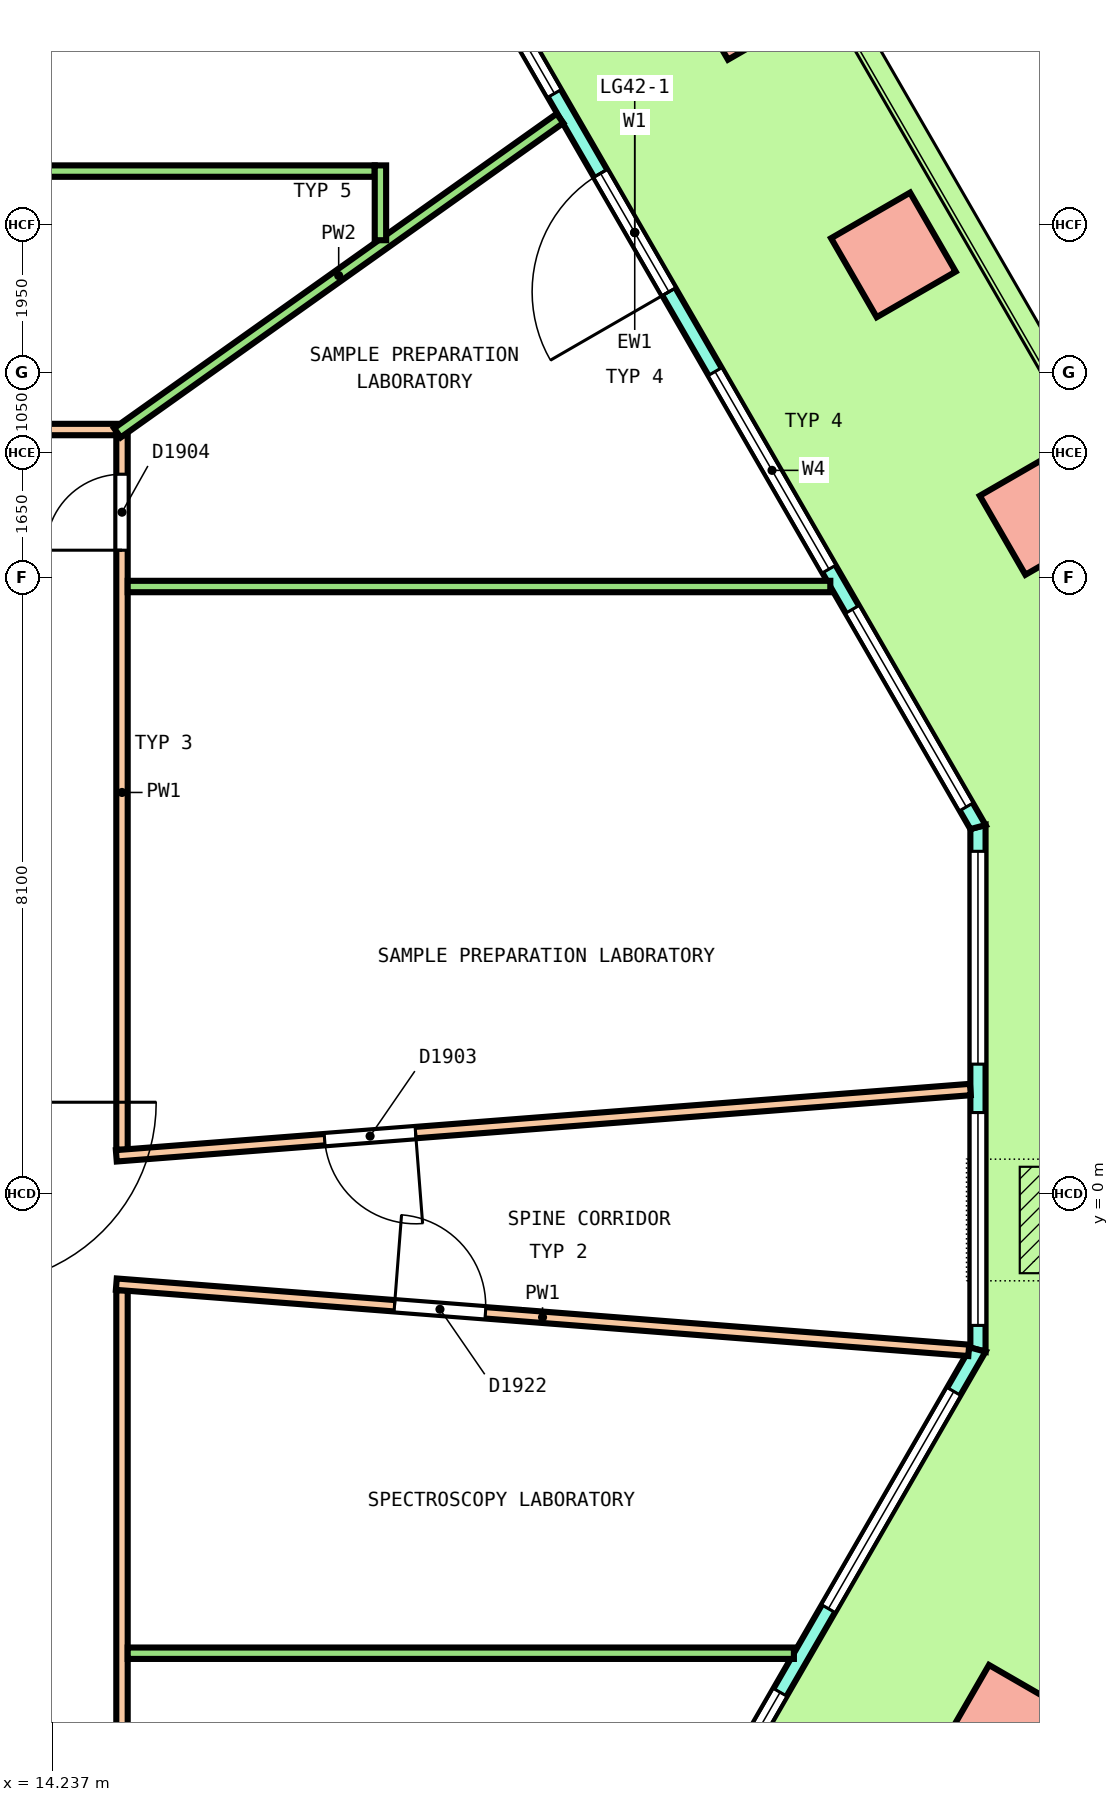
"""IFC4 building model, lengths in metres.
Left out: names, types, materials, properties, quantities, classifications, styles, units other than length and angle.
Written with IfcOpenShell. Run it as: python <this file> out.ifc"""

import sys

from ifc_helpers import new_model, si_unit, direction, frame, frame_2d, origin, origin_2d, place, context, subcontext, project, spatial, polyline, rectangle, outline, extrude, element, fill, save


model = new_model("IFC4")
c1 = context("Model", 3, precision=1e-05, world=origin(), true_north=direction((0.0, 1.0)))
c2 = subcontext(c1, "Body", "Model", "MODEL_VIEW")
j1 = project(units=[si_unit("LENGTHUNIT", "METRE"), si_unit("PLANEANGLEUNIT", "RADIAN")], contexts=[c1])
p1 = place(None, origin())
s1 = spatial("IfcSite", under=j1, at=p1, CompositionType="ELEMENT")
p2 = place(p1, origin())
s2 = spatial("IfcBuilding", under=s1, at=p2, CompositionType="ELEMENT")
p3 = place(p2, frame((0.0, 0.0, 193.6)))
s3 = spatial("IfcBuildingStorey", under=s2, at=p3, CompositionType="ELEMENT", Elevation=193.6)
for number, where, z_axis, x_axis in (
    (1, (27.255, 8.959, 0.0), (0.0, 0.0, 1.0), (-0.5, 0.866, 0.0)),
    (2, (25.299, 12.347, 0.0), (0.0, 0.0, 1.0), (-0.5, 0.866, 0.0)),
    (3, (23.342, 15.736, 0.0), (0.0, 0.0, 1.0), (-0.5, 0.866, 0.0)),
    (4, (26.776, -7.023, 0.0), (0.0, 0.0, 1.0), (0.5, 0.866, 0.0)),
):
    element("IfcColumn", number, at=place(p3, frame(where, z_axis=z_axis, x_axis=x_axis)), inside=s3, PredefinedType="COLUMN", context=c2, shape_type="SweptSolid", body=[
        extrude(rectangle(XDim=1.2, YDim=1.2, at=origin_2d()), origin(), (0.0, 0.0, 1.0), 4.04),
    ])
p4 = place(p3, frame((26.411, -2.055, 0.0), z_axis=(0.0, 0.0, 1.0), x_axis=(0.0, 1.0, 0.0)))
e5 = element("IfcWall", 5, at=p4, inside=s3, PredefinedType="SOLIDWALL", context=c2, shape_type="SweptSolid", body=[
    extrude(outline(polyline([(-0.027, -0.1), (1.128, -0.1), (2.283, -0.1), (3.438, -0.1), (4.592, -0.1), (5.747, -0.1), (6.902, -0.1), (6.848, 0.1), (5.711, 0.1), (4.574, 0.1), (3.438, 0.1), (2.301, 0.1), (1.164, 0.1), (0.027, 0.1), (-0.027, -0.1)])), origin(), (0.0, 0.0, 1.0), 4.1),
])
p5 = place(p4, frame((0.319, 0.0, 0.1)))
e6 = element("IfcOpeningElement", 6, at=p5, cuts=e5, PredefinedType="OPENING", context=c2, shape_type="SweptSolid", body=[
    extrude(rectangle(XDim=2.8, YDim=2.9, at=frame_2d((1.4, 1.45))), frame((0.0, 0.11, 0.0), z_axis=(0.0, -1.0, 0.0), x_axis=(1.0, 0.0, 0.0)), (0.0, 0.0, 1.0), 0.22),
])
p6 = place(p4, frame((3.756, 0.0, 0.1)))
e7 = element("IfcOpeningElement", 7, at=p6, cuts=e5, PredefinedType="OPENING", context=c2, shape_type="SweptSolid", body=[
    extrude(rectangle(XDim=2.8, YDim=2.9, at=frame_2d((1.4, 1.45))), frame((0.0, 0.11, 0.0), z_axis=(0.0, -1.0, 0.0), x_axis=(1.0, 0.0, 0.0)), (0.0, 0.0, 1.0), 0.22),
])
p7 = place(p3, frame((26.411, 4.82, 0.0), z_axis=(0.0, 0.0, 1.0), x_axis=(-0.500000137386, 0.866025324465, 0.0)))
e8 = element("IfcWall", 8, at=p7, inside=s3, PredefinedType="SOLIDWALL", context=c2, shape_type="SweptSolid", body=[
    extrude(outline(polyline([(-0.027, -0.1), (0.979, -0.1), (1.986, -0.1), (2.992, -0.1), (3.999, -0.1), (5.005, -0.1), (6.012, -0.1), (7.018, -0.1), (8.025, -0.1), (9.031, -0.1), (10.038, -0.1), (11.044, -0.1), (12.051, -0.1), (13.057, -0.1), (14.063, -0.1), (15.07, -0.1), (16.076, -0.1), (17.083, -0.1), (18.089, -0.1), (18.036, 0.1), (17.035, 0.1), (16.035, 0.1), (15.034, 0.1), (14.034, 0.1), (13.033, 0.1), (12.033, 0.1), (11.032, 0.1), (10.032, 0.1), (9.031, 0.1), (8.031, 0.1), (7.03, 0.1), (6.03, 0.1), (5.029, 0.1), (4.029, 0.1), (3.028, 0.1), (2.028, 0.1), (1.027, 0.1), (0.027, 0.1), (-0.027, -0.1)])), origin(), (0.0, 0.0, 1.0), 4.1),
])
p8 = place(p7, frame((0.306, 0.0, 0.1)))
e9 = element("IfcOpeningElement", 9, at=p8, cuts=e8, PredefinedType="OPENING", context=c2, shape_type="SweptSolid", body=[
    extrude(rectangle(XDim=3.0, YDim=2.9, at=frame_2d((1.5, 1.45))), frame((0.0, 0.11, 0.0), z_axis=(0.0, -1.0, 0.0), x_axis=(1.0, 0.0, 0.0)), (0.0, 0.0, 1.0), 0.22),
])
p9 = place(p7, frame((3.919, 0.0, 0.1)))
e10 = element("IfcOpeningElement", 10, at=p9, cuts=e8, PredefinedType="OPENING", context=c2, shape_type="SweptSolid", body=[
    extrude(rectangle(XDim=3.0, YDim=2.9, at=frame_2d((1.5, 1.45))), frame((0.0, 0.11, 0.0), z_axis=(0.0, -1.0, 0.0), x_axis=(1.0, 0.0, 0.0)), (0.0, 0.0, 1.0), 0.22),
])
p10 = place(p7, frame((8.131, 0.0, 0.0)))
e11 = element("IfcOpeningElement", 11, at=p10, cuts=e8, PredefinedType="OPENING", context=c2, shape_type="SweptSolid", body=[
    extrude(rectangle(XDim=1.8, YDim=2.4, at=frame_2d((0.9, 1.2))), frame((0.0, 0.11, 0.0), z_axis=(0.0, -1.0, 0.0), x_axis=(1.0, 0.0, 0.0)), (0.0, 0.0, 1.0), 0.22),
])
p11 = place(p7, frame((8.131, 0.0, 2.55)))
e12 = element("IfcOpeningElement", 12, at=p11, cuts=e8, PredefinedType="OPENING", context=c2, shape_type="SweptSolid", body=[
    extrude(rectangle(XDim=1.8, YDim=0.45, at=frame_2d((0.9, 0.225))), frame((0.0, 0.11, 0.0), z_axis=(0.0, -1.0, 0.0), x_axis=(1.0, 0.0, 0.0)), (0.0, 0.0, 1.0), 0.22),
])
p12 = place(p7, frame((11.144, 0.0, 0.1)))
e13 = element("IfcOpeningElement", 13, at=p12, cuts=e8, PredefinedType="OPENING", context=c2, shape_type="SweptSolid", body=[
    extrude(rectangle(XDim=3.0, YDim=2.9, at=frame_2d((1.5, 1.45))), frame((0.0, 0.11, 0.0), z_axis=(0.0, -1.0, 0.0), x_axis=(1.0, 0.0, 0.0)), (0.0, 0.0, 1.0), 0.22),
])
p13 = place(p7, frame((14.756, 0.0, 0.1)))
e14 = element("IfcOpeningElement", 14, at=p13, cuts=e8, PredefinedType="OPENING", context=c2, shape_type="SweptSolid", body=[
    extrude(rectangle(XDim=3.0, YDim=2.9, at=frame_2d((1.5, 1.45))), frame((0.0, 0.11, 0.0), z_axis=(0.0, -1.0, 0.0), x_axis=(1.0, 0.0, 0.0)), (0.0, 0.0, 1.0), 0.22),
])
p14 = place(p3, frame((14.985, -21.845, 0.0), z_axis=(0.0, 0.0, 1.0), x_axis=(0.50000204422, 0.86602422355, 0.0)))
e15 = element("IfcWall", 15, at=p14, inside=s3, PredefinedType="SOLIDWALL", context=c2, shape_type="SweptSolid", body=[
    extrude(outline(polyline([(-0.027, -0.1), (1.014, -0.1), (2.055, -0.1), (3.097, -0.1), (4.138, -0.1), (5.179, -0.1), (6.22, -0.1), (7.261, -0.1), (8.303, -0.1), (9.344, -0.1), (10.385, -0.1), (11.426, -0.1), (12.468, -0.1), (13.509, -0.1), (14.55, -0.1), (15.591, -0.1), (16.632, -0.1), (17.673, -0.1), (18.715, -0.1), (19.756, -0.1), (20.797, -0.1), (21.838, -0.1), (22.879, -0.1), (22.826, 0.1), (21.789, 0.1), (20.753, 0.1), (19.717, 0.1), (18.68, 0.1), (17.644, 0.1), (16.608, 0.1), (15.572, 0.1), (14.535, 0.1), (13.499, 0.1), (12.463, 0.1), (11.426, 0.1), (10.39, 0.1), (9.354, 0.1), (8.317, 0.1), (7.281, 0.1), (6.245, 0.1), (5.208, 0.1), (4.172, 0.1), (3.136, 0.1), (2.099, 0.1), (1.063, 0.1), (0.027, 0.1), (-0.027, -0.1)])), origin(), (0.0, 0.0, 1.0), 4.1),
])
p15 = place(p14, frame((0.635, 0.0, 0.1)))
e16 = element("IfcOpeningElement", 16, at=p15, cuts=e15, PredefinedType="OPENING", context=c2, shape_type="SweptSolid", body=[
    extrude(rectangle(XDim=3.3, YDim=2.9, at=frame_2d((1.65, 1.45))), frame((0.0, 0.11, 0.0), z_axis=(0.0, -1.0, 0.0), x_axis=(1.0, 0.0, 0.0)), (0.0, 0.0, 1.0), 0.22),
])
p16 = place(p14, frame((5.206, 0.0, 0.1)))
e17 = element("IfcOpeningElement", 17, at=p16, cuts=e15, PredefinedType="OPENING", context=c2, shape_type="SweptSolid", body=[
    extrude(rectangle(XDim=3.3, YDim=2.9, at=frame_2d((1.65, 1.45))), frame((0.0, 0.11, 0.0), z_axis=(0.0, -1.0, 0.0), x_axis=(1.0, 0.0, 0.0)), (0.0, 0.0, 1.0), 0.22),
])
p17 = place(p14, frame((10.526, 0.0, 0.0)))
e18 = element("IfcOpeningElement", 18, at=p17, cuts=e15, PredefinedType="OPENING", context=c2, shape_type="SweptSolid", body=[
    extrude(rectangle(XDim=1.8, YDim=2.4, at=frame_2d((0.9, 1.2))), frame((0.0, 0.11, 0.0), z_axis=(0.0, -1.0, 0.0), x_axis=(1.0, 0.0, 0.0)), (0.0, 0.0, 1.0), 0.22),
])
p18 = place(p14, frame((10.526, 0.0, 2.55)))
e19 = element("IfcOpeningElement", 19, at=p18, cuts=e15, PredefinedType="OPENING", context=c2, shape_type="SweptSolid", body=[
    extrude(rectangle(XDim=1.8, YDim=0.45, at=frame_2d((0.9, 0.225))), frame((0.0, 0.11, 0.0), z_axis=(0.0, -1.0, 0.0), x_axis=(1.0, 0.0, 0.0)), (0.0, 0.0, 1.0), 0.22),
])
p19 = place(p14, frame((14.347, 0.0, 0.1)))
e20 = element("IfcOpeningElement", 20, at=p19, cuts=e15, PredefinedType="OPENING", context=c2, shape_type="SweptSolid", body=[
    extrude(rectangle(XDim=3.3, YDim=2.9, at=frame_2d((1.65, 1.45))), frame((0.0, 0.11, 0.0), z_axis=(0.0, -1.0, 0.0), x_axis=(1.0, 0.0, 0.0)), (0.0, 0.0, 1.0), 0.22),
])
p20 = place(p14, frame((18.917, 0.0, 0.1)))
e21 = element("IfcOpeningElement", 21, at=p20, cuts=e15, PredefinedType="OPENING", context=c2, shape_type="SweptSolid", body=[
    extrude(rectangle(XDim=3.3, YDim=2.9, at=frame_2d((1.65, 1.45))), frame((0.0, 0.11, 0.0), z_axis=(0.0, -1.0, 0.0), x_axis=(1.0, 0.0, 0.0)), (0.0, 0.0, 1.0), 0.22),
])
p21 = place(p3, frame((15.15, -9.966, 0.0), z_axis=(0.0, 0.0, 1.0), x_axis=(0.0, 1.0, 0.0)))
e22 = element("IfcWall", 22, at=p21, inside=s3, PredefinedType="PARTITIONING", context=c2, shape_type="SweptSolid", body=[
    extrude(rectangle(XDim=8.692, YDim=0.15, at=frame_2d((4.346, 0.0))), origin(), (0.0, 0.0, 1.0), 3.05),
])
p22 = place(p21, frame((1.434, 0.0, 0.0)))
e23 = element("IfcOpeningElement", 23, at=p22, cuts=e22, PredefinedType="OPENING", context=c2, shape_type="SweptSolid", body=[
    extrude(rectangle(XDim=1.0, YDim=2.1, at=frame_2d((0.5, 1.05))), frame((0.0, 0.085, 0.0), z_axis=(0.0, -1.0, 0.0), x_axis=(1.0, 0.0, 0.0)), (0.0, 0.0, 1.0), 0.17),
])
p23 = place(p3, frame((15.15, 0.576, 0.0), z_axis=(0.0, 0.0, 1.0), x_axis=(0.0, 1.0, 0.0)))
e24 = element("IfcWall", 24, at=p23, inside=s3, PredefinedType="PARTITIONING", context=c2, shape_type="SweptSolid", body=[
    extrude(rectangle(XDim=9.399, YDim=0.15, at=frame_2d((4.7, 0.0))), origin(), (0.0, 0.0, 1.0), 3.05),
])
p24 = place(p23, frame((7.887, 0.0, 0.0)))
e25 = element("IfcOpeningElement", 25, at=p24, cuts=e24, PredefinedType="OPENING", context=c2, shape_type="SweptSolid", body=[
    extrude(rectangle(XDim=1.0, YDim=2.1, at=frame_2d((0.5, 1.05))), frame((0.0, 0.085, 0.0), z_axis=(0.0, -1.0, 0.0), x_axis=(1.0, 0.0, 0.0)), (0.0, 0.0, 1.0), 0.17),
])
p25 = place(p3, frame((-15.075, 10.05, 0.0), z_axis=(0.0, 0.0, 1.0), x_axis=(1.0, 0.0, 0.0)))
e26 = element("IfcWall", 26, at=p25, inside=s3, PredefinedType="PARTITIONING", context=c2, shape_type="SweptSolid", body=[
    extrude(rectangle(XDim=30.15, YDim=0.15, at=frame_2d((15.075, 0.0))), origin(), (0.0, 0.0, 1.0), 3.05),
])
p26 = place(p25, frame((26.573, 0.0, 0.0)))
e27 = element("IfcOpeningElement", 27, at=p26, cuts=e26, PredefinedType="OPENING", context=c2, shape_type="SweptSolid", body=[
    extrude(rectangle(XDim=1.0, YDim=2.1, at=frame_2d((0.5, 1.05))), frame((0.0, 0.085, 0.0), z_axis=(0.0, -1.0, 0.0), x_axis=(1.0, 0.0, 0.0)), (0.0, 0.0, 1.0), 0.17),
])
p27 = place(p25, frame((10.684, 0.0, 0.0)))
e28 = element("IfcOpeningElement", 28, at=p27, cuts=e26, PredefinedType="OPENING", context=c2, shape_type="SweptSolid", body=[
    extrude(rectangle(XDim=1.2, YDim=2.1, at=frame_2d((0.6, 1.05))), frame((0.0, 0.085, 0.0), z_axis=(0.0, -1.0, 0.0), x_axis=(1.0, 0.0, 0.0)), (0.0, 0.0, 1.0), 0.17),
])
p28 = place(p3, frame((15.075, 0.495, 0.0), z_axis=(0.0, 0.0, 1.0), x_axis=(0.996999820834, 0.077403858151, 0.0)))
e29 = element("IfcWall", 29, at=p28, inside=s3, PredefinedType="PARTITIONING", context=c2, shape_type="SweptSolid", body=[
    extrude(rectangle(XDim=11.27, YDim=0.15, at=frame_2d((5.635, 0.0))), origin(), (0.0, 0.0, 1.0), 3.05),
])
p29 = place(p28, frame((2.749, 0.0, 0.0)))
e30 = element("IfcOpeningElement", 30, at=p29, cuts=e29, PredefinedType="OPENING", context=c2, shape_type="SweptSolid", body=[
    extrude(rectangle(XDim=1.2, YDim=2.1, at=frame_2d((0.6, 1.05))), frame((0.0, 0.085, 0.0), z_axis=(0.0, -1.0, 0.0), x_axis=(1.0, 0.0, 0.0)), (0.0, 0.0, 1.0), 0.17),
])
p30 = place(p3, frame((15.075, -1.194, 0.0), z_axis=(0.0, 0.0, 1.0), x_axis=(0.997000362213, -0.077396884614, 0.0)))
e31 = element("IfcWall", 31, at=p30, inside=s3, PredefinedType="PARTITIONING", context=c2, shape_type="SweptSolid", body=[
    extrude(rectangle(XDim=11.249, YDim=0.15, at=frame_2d((5.624, 0.0))), origin(), (0.0, 0.0, 1.0), 3.05),
])
p31 = place(p30, frame((3.671, 0.0, 0.0)))
e32 = element("IfcOpeningElement", 32, at=p31, cuts=e31, PredefinedType="OPENING", context=c2, shape_type="SweptSolid", body=[
    extrude(rectangle(XDim=1.2, YDim=2.1, at=frame_2d((0.6, 1.05))), frame((0.0, 0.085, 0.0), z_axis=(0.0, -1.0, 0.0), x_axis=(1.0, 0.0, 0.0)), (0.0, 0.0, 1.0), 0.17),
])
p32 = place(p3, frame((15.225, 7.985, 0.0), z_axis=(0.0, 0.0, 1.0), x_axis=(1.0, 0.0, 0.0)))
e33 = element("IfcWall", 33, at=p32, inside=s3, PredefinedType="PARTITIONING", context=c2, shape_type="SweptSolid", body=[
    extrude(rectangle(XDim=9.243, YDim=0.15, at=frame_2d((4.622, 0.0))), origin(), (0.0, 0.0, 1.0), 3.05),
])
p33 = place(p3, frame((15.089, 10.007, 0.0), z_axis=(0.0, 0.0, 1.0), x_axis=(0.815227116073, 0.579141389661, 0.0)))
e34 = element("IfcWall", 34, at=p33, inside=s3, PredefinedType="PARTITIONING", context=c2, shape_type="SweptSolid", body=[
    extrude(rectangle(XDim=7.144, YDim=0.15, at=frame_2d((3.572, 0.0))), origin(), (0.0, 0.0, 1.0), 3.05),
])
p34 = place(p3, frame((-16.979, 13.45, 0.0), z_axis=(0.0, 0.0, 1.0), x_axis=(1.0, 0.0, 0.0)))
e35 = element("IfcWall", 35, at=p34, inside=s3, PredefinedType="PARTITIONING", context=c2, shape_type="SweptSolid", body=[
    extrude(rectangle(XDim=35.454, YDim=0.15, at=frame_2d((17.727, 0.0))), origin(), (0.0, 0.0, 1.0), 3.05),
])
p35 = place(p34, frame((27.623, 0.0, 0.0)))
e36 = element("IfcOpeningElement", 36, at=p35, cuts=e35, PredefinedType="OPENING", context=c2, shape_type="SweptSolid", body=[
    extrude(rectangle(XDim=1.2, YDim=2.1, at=frame_2d((0.6, 1.05))), frame((0.0, 0.085, 0.0), z_axis=(0.0, -1.0, 0.0), x_axis=(1.0, 0.0, 0.0)), (0.0, 0.0, 1.0), 0.17),
])
p36 = place(p3, frame((18.55, 12.541, 0.0), z_axis=(0.0, 0.0, 1.0), x_axis=(0.0, 1.0, 0.0)))
e37 = element("IfcWall", 37, at=p36, inside=s3, PredefinedType="PARTITIONING", context=c2, shape_type="SweptSolid", body=[
    extrude(rectangle(XDim=0.984, YDim=0.15, at=frame_2d((0.492, 0.0))), origin(), (0.0, 0.0, 1.0), 3.05),
])
p37 = place(p3, frame((15.225, -6.049, 0.0), z_axis=(0.0, 0.0, 1.0), x_axis=(1.0, 0.0, 0.0)))
e38 = element("IfcWall", 38, at=p37, inside=s3, PredefinedType="PARTITIONING", context=c2, shape_type="SweptSolid", body=[
    extrude(rectangle(XDim=8.764, YDim=0.15, at=frame_2d((4.382, 0.0))), origin(), (0.0, 0.0, 1.0), 3.05),
])
p38 = place(p5, origin())
e39 = element("IfcWindow", 39, at=p38, inside=s3, PartitioningType="SINGLE_PANEL", PredefinedType="WINDOW", context=c2, shape_type="SweptSolid", body=[
    extrude(rectangle(XDim=2.8, YDim=2.9, at=frame_2d((1.4, 1.45))), frame((0.0, 0.03, 0.0), z_axis=(0.0, -1.0, 0.0), x_axis=(1.0, 0.0, 0.0)), (0.0, 0.0, 1.0), 0.06),
])
fill(e6, e39)
p39 = place(p6, origin())
e40 = element("IfcWindow", 40, at=p39, inside=s3, PartitioningType="SINGLE_PANEL", PredefinedType="WINDOW", context=c2, shape_type="SweptSolid", body=[
    extrude(rectangle(XDim=2.8, YDim=2.9, at=frame_2d((1.4, 1.45))), frame((0.0, 0.03, 0.0), z_axis=(0.0, -1.0, 0.0), x_axis=(1.0, 0.0, 0.0)), (0.0, 0.0, 1.0), 0.06),
])
fill(e7, e40)
p40 = place(p8, origin())
e41 = element("IfcWindow", 41, at=p40, inside=s3, PartitioningType="SINGLE_PANEL", PredefinedType="WINDOW", context=c2, shape_type="SweptSolid", body=[
    extrude(rectangle(XDim=3.0, YDim=2.9, at=frame_2d((1.5, 1.45))), frame((0.0, 0.03, 0.0), z_axis=(0.0, -1.0, 0.0), x_axis=(1.0, 0.0, 0.0)), (0.0, 0.0, 1.0), 0.06),
])
fill(e9, e41)
p41 = place(p9, origin())
e42 = element("IfcWindow", 42, at=p41, inside=s3, PartitioningType="SINGLE_PANEL", PredefinedType="WINDOW", context=c2, shape_type="SweptSolid", body=[
    extrude(rectangle(XDim=3.0, YDim=2.9, at=frame_2d((1.5, 1.45))), frame((0.0, 0.03, 0.0), z_axis=(0.0, -1.0, 0.0), x_axis=(1.0, 0.0, 0.0)), (0.0, 0.0, 1.0), 0.06),
])
fill(e10, e42)
p42 = place(p10, origin())
e43 = element("IfcDoor", 43, at=p42, inside=s3, OperationType="DOUBLE_DOOR_SINGLE_SWING", PredefinedType="DOOR", context=c2, shape_type="SweptSolid", body=[
    extrude(rectangle(XDim=1.8, YDim=2.4, at=frame_2d((0.9, 1.2))), frame((0.0, 0.025, 0.0), z_axis=(0.0, -1.0, 0.0), x_axis=(1.0, 0.0, 0.0)), (0.0, 0.0, 1.0), 0.05),
])
fill(e11, e43)
p43 = place(p11, origin())
e44 = element("IfcWindow", 44, at=p43, inside=s3, PartitioningType="SINGLE_PANEL", PredefinedType="WINDOW", context=c2, shape_type="SweptSolid", body=[
    extrude(rectangle(XDim=1.8, YDim=0.45, at=frame_2d((0.9, 0.225))), frame((0.0, 0.03, 0.0), z_axis=(0.0, -1.0, 0.0), x_axis=(1.0, 0.0, 0.0)), (0.0, 0.0, 1.0), 0.06),
])
fill(e12, e44)
p44 = place(p12, origin())
e45 = element("IfcWindow", 45, at=p44, inside=s3, PartitioningType="SINGLE_PANEL", PredefinedType="WINDOW", context=c2, shape_type="SweptSolid", body=[
    extrude(rectangle(XDim=3.0, YDim=2.9, at=frame_2d((1.5, 1.45))), frame((0.0, 0.03, 0.0), z_axis=(0.0, -1.0, 0.0), x_axis=(1.0, 0.0, 0.0)), (0.0, 0.0, 1.0), 0.06),
])
fill(e13, e45)
p45 = place(p19, origin())
e46 = element("IfcWindow", 46, at=p45, inside=s3, PartitioningType="SINGLE_PANEL", PredefinedType="WINDOW", context=c2, shape_type="SweptSolid", body=[
    extrude(rectangle(XDim=3.3, YDim=2.9, at=frame_2d((1.65, 1.45))), frame((0.0, 0.03, 0.0), z_axis=(0.0, -1.0, 0.0), x_axis=(1.0, 0.0, 0.0)), (0.0, 0.0, 1.0), 0.06),
])
fill(e20, e46)
p46 = place(p20, origin())
e47 = element("IfcWindow", 47, at=p46, inside=s3, PartitioningType="SINGLE_PANEL", PredefinedType="WINDOW", context=c2, shape_type="SweptSolid", body=[
    extrude(rectangle(XDim=3.3, YDim=2.9, at=frame_2d((1.65, 1.45))), frame((0.0, 0.03, 0.0), z_axis=(0.0, -1.0, 0.0), x_axis=(1.0, 0.0, 0.0)), (0.0, 0.0, 1.0), 0.06),
])
fill(e21, e47)
p47 = place(p29, origin())
e48 = element("IfcDoor", 48, at=p47, inside=s3, OperationType="DOUBLE_DOOR_SINGLE_SWING", PredefinedType="DOOR", context=c2, shape_type="SweptSolid", body=[
    extrude(rectangle(XDim=1.2, YDim=2.1, at=frame_2d((0.6, 1.05))), frame((0.0, 0.025, 0.0), z_axis=(0.0, -1.0, 0.0), x_axis=(1.0, 0.0, 0.0)), (0.0, 0.0, 1.0), 0.05),
])
fill(e30, e48)
p48 = place(p24, origin())
e49 = element("IfcDoor", 49, at=p48, inside=s3, OperationType="SINGLE_SWING_RIGHT", PredefinedType="DOOR", context=c2, shape_type="SweptSolid", body=[
    extrude(rectangle(XDim=1.0, YDim=2.1, at=frame_2d((0.5, 1.05))), frame((0.0, 0.025, 0.0), z_axis=(0.0, -1.0, 0.0), x_axis=(1.0, 0.0, 0.0)), (0.0, 0.0, 1.0), 0.05),
])
fill(e25, e49)
p49 = place(p31, origin())
e50 = element("IfcDoor", 50, at=p49, inside=s3, OperationType="DOUBLE_DOOR_SINGLE_SWING", PredefinedType="DOOR", context=c2, shape_type="SweptSolid", body=[
    extrude(rectangle(XDim=1.2, YDim=2.1, at=frame_2d((0.6, 1.05))), frame((0.0, 0.025, 0.0), z_axis=(0.0, -1.0, 0.0), x_axis=(1.0, 0.0, 0.0)), (0.0, 0.0, 1.0), 0.05),
])
fill(e32, e50)
save(model, sys.argv[1])
